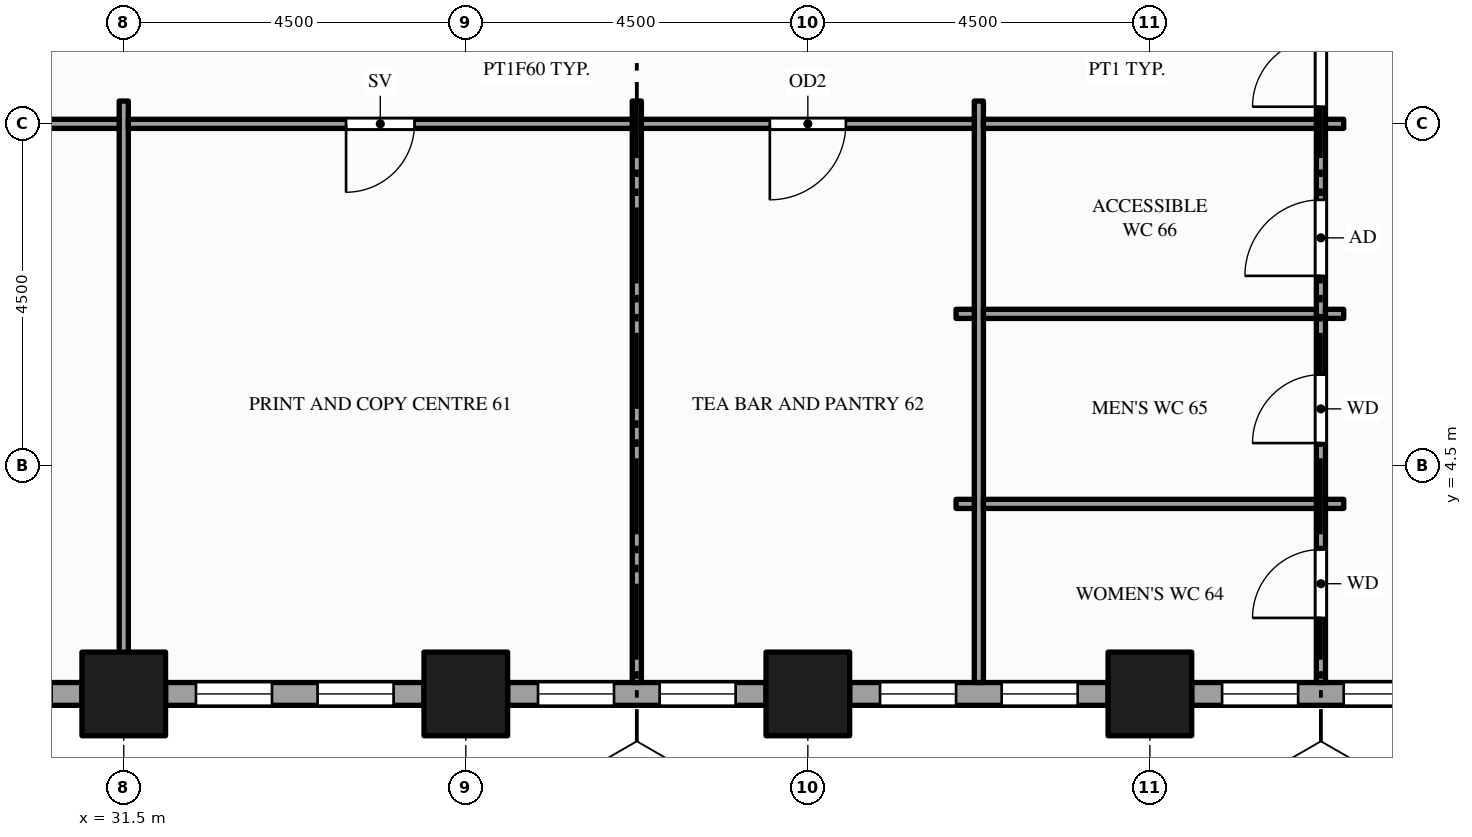
"""IFC4 building model, lengths in metres.
Left out: names, types, materials, properties, quantities, classifications, styles, units other than length and angle.
Written with IfcOpenShell. Run it as: python <this file> out.ifc"""

import sys

from ifc_helpers import new_model, si_unit, direction, frame, frame_2d, origin, origin_2d, place, context, subcontext, project, spatial, rectangle, hollow_rectangle, extrude, element, fill, save


model = new_model("IFC4")
c1 = context("Model", 3, precision=1e-05, world=origin(), true_north=direction((0.0, 1.0)))
c2 = subcontext(c1, "Body", "Model", "MODEL_VIEW")
j1 = project(units=[si_unit("LENGTHUNIT", "METRE"), si_unit("PLANEANGLEUNIT", "RADIAN")], contexts=[c1])
p1 = place(None, origin())
s1 = spatial("IfcSite", under=j1, at=p1, CompositionType="ELEMENT")
p2 = place(p1, origin())
s2 = spatial("IfcBuilding", under=s1, at=p2, CompositionType="ELEMENT")
p3 = place(p2, frame((0.0, 0.0, 69.0)))
s3 = spatial("IfcBuildingStorey", under=s2, at=p3, CompositionType="ELEMENT", Elevation=69.0)
for number, where, z_axis, x_axis in (
    (1, (31.5, 1.5, -0.15), (0.0, 0.0, 1.0), (1.0, 0.0, 0.0)),
    (2, (36.0, 1.5, -0.15), (0.0, 0.0, 1.0), (1.0, 0.0, 0.0)),
    (3, (40.5, 1.5, -0.15), (0.0, 0.0, 1.0), (1.0, 0.0, 0.0)),
    (4, (45.0, 1.5, -0.15), (0.0, 0.0, 1.0), (1.0, 0.0, 0.0)),
):
    element("IfcColumn", number, at=place(p3, frame(where, z_axis=z_axis, x_axis=x_axis)), inside=s3, PredefinedType="COLUMN", context=c2, shape_type="SweptSolid", body=[
        extrude(hollow_rectangle(XDim=1.1, YDim=1.1, WallThickness=0.06, at=origin_2d()), origin(), (0.0, 0.0, 1.0), 4.0),
    ])
p4 = place(p3, frame((27.55, 1.5, 0.0), z_axis=(0.0, 0.0, 1.0), x_axis=(1.0, 0.0, 0.0)))
e5 = element("IfcWall", 5, at=p4, inside=s3, PredefinedType="STANDARD", context=c2, shape_type="SweptSolid", body=[
    extrude(rectangle(XDim=3.4, YDim=0.3, at=frame_2d((1.7, 0.0))), origin(), (0.0, 0.0, 1.0), 3.144),
])
p5 = place(p4, frame((0.4, 0.0, 0.9)))
e6 = element("IfcOpeningElement", 6, at=p5, cuts=e5, PredefinedType="OPENING", context=c2, shape_type="SweptSolid", body=[
    extrude(rectangle(XDim=1.0, YDim=2.0, at=frame_2d((0.5, 1.0))), frame((0.0, 0.16, 0.0), z_axis=(0.0, -1.0, 0.0), x_axis=(1.0, 0.0, 0.0)), (0.0, 0.0, 1.0), 0.32),
])
p6 = place(p4, frame((2.0, 0.0, 0.9)))
e7 = element("IfcOpeningElement", 7, at=p6, cuts=e5, PredefinedType="OPENING", context=c2, shape_type="SweptSolid", body=[
    extrude(rectangle(XDim=1.0, YDim=2.0, at=frame_2d((0.5, 1.0))), frame((0.0, 0.16, 0.0), z_axis=(0.0, -1.0, 0.0), x_axis=(1.0, 0.0, 0.0)), (0.0, 0.0, 1.0), 0.32),
])
p7 = place(p3, frame((32.05, 1.5, 0.0), z_axis=(0.0, 0.0, 1.0), x_axis=(1.0, 0.0, 0.0)))
e8 = element("IfcWall", 8, at=p7, inside=s3, PredefinedType="STANDARD", context=c2, shape_type="SweptSolid", body=[
    extrude(rectangle(XDim=3.4, YDim=0.3, at=frame_2d((1.7, 0.0))), origin(), (0.0, 0.0, 1.0), 3.144),
])
p8 = place(p7, frame((0.4, 0.0, 0.9)))
e9 = element("IfcOpeningElement", 9, at=p8, cuts=e8, PredefinedType="OPENING", context=c2, shape_type="SweptSolid", body=[
    extrude(rectangle(XDim=1.0, YDim=2.0, at=frame_2d((0.5, 1.0))), frame((0.0, 0.16, 0.0), z_axis=(0.0, -1.0, 0.0), x_axis=(1.0, 0.0, 0.0)), (0.0, 0.0, 1.0), 0.32),
])
p9 = place(p7, frame((2.0, 0.0, 0.9)))
e10 = element("IfcOpeningElement", 10, at=p9, cuts=e8, PredefinedType="OPENING", context=c2, shape_type="SweptSolid", body=[
    extrude(rectangle(XDim=1.0, YDim=2.0, at=frame_2d((0.5, 1.0))), frame((0.0, 0.16, 0.0), z_axis=(0.0, -1.0, 0.0), x_axis=(1.0, 0.0, 0.0)), (0.0, 0.0, 1.0), 0.32),
])
p10 = place(p3, frame((36.55, 1.5, 0.0), z_axis=(0.0, 0.0, 1.0), x_axis=(1.0, 0.0, 0.0)))
e11 = element("IfcWall", 11, at=p10, inside=s3, PredefinedType="STANDARD", context=c2, shape_type="SweptSolid", body=[
    extrude(rectangle(XDim=3.4, YDim=0.3, at=frame_2d((1.7, 0.0))), origin(), (0.0, 0.0, 1.0), 3.144),
])
p11 = place(p10, frame((0.4, 0.0, 0.9)))
e12 = element("IfcOpeningElement", 12, at=p11, cuts=e11, PredefinedType="OPENING", context=c2, shape_type="SweptSolid", body=[
    extrude(rectangle(XDim=1.0, YDim=2.0, at=frame_2d((0.5, 1.0))), frame((0.0, 0.16, 0.0), z_axis=(0.0, -1.0, 0.0), x_axis=(1.0, 0.0, 0.0)), (0.0, 0.0, 1.0), 0.32),
])
p12 = place(p10, frame((2.0, 0.0, 0.9)))
e13 = element("IfcOpeningElement", 13, at=p12, cuts=e11, PredefinedType="OPENING", context=c2, shape_type="SweptSolid", body=[
    extrude(rectangle(XDim=1.0, YDim=2.0, at=frame_2d((0.5, 1.0))), frame((0.0, 0.16, 0.0), z_axis=(0.0, -1.0, 0.0), x_axis=(1.0, 0.0, 0.0)), (0.0, 0.0, 1.0), 0.32),
])
p13 = place(p3, frame((41.05, 1.5, 0.0), z_axis=(0.0, 0.0, 1.0), x_axis=(1.0, 0.0, 0.0)))
e14 = element("IfcWall", 14, at=p13, inside=s3, PredefinedType="STANDARD", context=c2, shape_type="SweptSolid", body=[
    extrude(rectangle(XDim=3.4, YDim=0.3, at=frame_2d((1.7, 0.0))), origin(), (0.0, 0.0, 1.0), 3.144),
])
p14 = place(p13, frame((0.4, 0.0, 0.9)))
e15 = element("IfcOpeningElement", 15, at=p14, cuts=e14, PredefinedType="OPENING", context=c2, shape_type="SweptSolid", body=[
    extrude(rectangle(XDim=1.0, YDim=2.0, at=frame_2d((0.5, 1.0))), frame((0.0, 0.16, 0.0), z_axis=(0.0, -1.0, 0.0), x_axis=(1.0, 0.0, 0.0)), (0.0, 0.0, 1.0), 0.32),
])
p15 = place(p13, frame((2.0, 0.0, 0.9)))
e16 = element("IfcOpeningElement", 16, at=p15, cuts=e14, PredefinedType="OPENING", context=c2, shape_type="SweptSolid", body=[
    extrude(rectangle(XDim=1.0, YDim=2.0, at=frame_2d((0.5, 1.0))), frame((0.0, 0.16, 0.0), z_axis=(0.0, -1.0, 0.0), x_axis=(1.0, 0.0, 0.0)), (0.0, 0.0, 1.0), 0.32),
])
p16 = place(p3, frame((45.55, 1.5, 0.0), z_axis=(0.0, 0.0, 1.0), x_axis=(1.0, 0.0, 0.0)))
e17 = element("IfcWall", 17, at=p16, inside=s3, PredefinedType="STANDARD", context=c2, shape_type="SweptSolid", body=[
    extrude(rectangle(XDim=3.4, YDim=0.3, at=frame_2d((1.7, 0.0))), origin(), (0.0, 0.0, 1.0), 3.144),
])
p17 = place(p16, frame((0.4, 0.0, 0.9)))
e18 = element("IfcOpeningElement", 18, at=p17, cuts=e17, PredefinedType="OPENING", context=c2, shape_type="SweptSolid", body=[
    extrude(rectangle(XDim=1.0, YDim=2.0, at=frame_2d((0.5, 1.0))), frame((0.0, 0.16, 0.0), z_axis=(0.0, -1.0, 0.0), x_axis=(1.0, 0.0, 0.0)), (0.0, 0.0, 1.0), 0.32),
])
p18 = place(p16, frame((2.0, 0.0, 0.9)))
e19 = element("IfcOpeningElement", 19, at=p18, cuts=e17, PredefinedType="OPENING", context=c2, shape_type="SweptSolid", body=[
    extrude(rectangle(XDim=1.0, YDim=2.0, at=frame_2d((0.5, 1.0))), frame((0.0, 0.16, 0.0), z_axis=(0.0, -1.0, 0.0), x_axis=(1.0, 0.0, 0.0)), (0.0, 0.0, 1.0), 0.32),
])
for number, where, z_axis, x_axis in (
    (20, (31.5, 1.65, 0.0), (0.0, 0.0, 1.0), (0.0, 1.0, 0.0)),
    (21, (38.25, 1.65, 0.0), (0.0, 0.0, 1.0), (0.0, 1.0, 0.0)),
    (22, (42.75, 1.65, 0.0), (0.0, 0.0, 1.0), (0.0, 1.0, 0.0)),
):
    element("IfcWall", number, at=place(p3, frame(where, z_axis=z_axis, x_axis=x_axis)), inside=s3, PredefinedType="PARTITIONING", context=c2, shape_type="SweptSolid", body=[
        extrude(rectangle(XDim=7.65, YDim=0.12, at=frame_2d((3.825, 0.0))), origin(), (0.0, 0.0, 1.0), 2.938),
    ])
p19 = place(p3, frame((47.25, 1.65, 0.0), z_axis=(0.0, 0.0, 1.0), x_axis=(0.0, 1.0, 0.0)))
e23 = element("IfcWall", 23, at=p19, inside=s3, PredefinedType="PARTITIONING", context=c2, shape_type="SweptSolid", body=[
    extrude(rectangle(XDim=22.2, YDim=0.12, at=frame_2d((11.1, 0.0))), origin(), (0.0, 0.0, 1.0), 2.938),
])
p20 = place(p19, frame((7.575, 0.0, 0.0)))
e24 = element("IfcOpeningElement", 24, at=p20, cuts=e23, PredefinedType="OPENING", context=c2, shape_type="SweptSolid", body=[
    extrude(rectangle(XDim=1.8, YDim=2.1, at=frame_2d((0.9, 1.05))), frame((0.0, 0.07, 0.0), z_axis=(0.0, -1.0, 0.0), x_axis=(1.0, 0.0, 0.0)), (0.0, 0.0, 1.0), 0.14),
])
p21 = place(p19, frame((0.85, 0.0, 0.0)))
e25 = element("IfcOpeningElement", 25, at=p21, cuts=e23, PredefinedType="OPENING", context=c2, shape_type="SweptSolid", body=[
    extrude(rectangle(XDim=0.9, YDim=2.1, at=frame_2d((0.45, 1.05))), frame((0.0, 0.07, 0.0), z_axis=(0.0, -1.0, 0.0), x_axis=(1.0, 0.0, 0.0)), (0.0, 0.0, 1.0), 0.14),
])
p22 = place(p19, frame((3.15, 0.0, 0.0)))
e26 = element("IfcOpeningElement", 26, at=p22, cuts=e23, PredefinedType="OPENING", context=c2, shape_type="SweptSolid", body=[
    extrude(rectangle(XDim=0.9, YDim=2.1, at=frame_2d((0.45, 1.05))), frame((0.0, 0.07, 0.0), z_axis=(0.0, -1.0, 0.0), x_axis=(1.0, 0.0, 0.0)), (0.0, 0.0, 1.0), 0.14),
])
p23 = place(p19, frame((5.35, 0.0, 0.0)))
e27 = element("IfcOpeningElement", 27, at=p23, cuts=e23, PredefinedType="OPENING", context=c2, shape_type="SweptSolid", body=[
    extrude(rectangle(XDim=1.0, YDim=2.1, at=frame_2d((0.5, 1.05))), frame((0.0, 0.07, 0.0), z_axis=(0.0, -1.0, 0.0), x_axis=(1.0, 0.0, 0.0)), (0.0, 0.0, 1.0), 0.14),
])
p24 = place(p3, frame((42.45, 4.0, 0.0), z_axis=(0.0, 0.0, 1.0), x_axis=(1.0, 0.0, 0.0)))
e28 = element("IfcWall", 28, at=p24, inside=s3, PredefinedType="PARTITIONING", context=c2, shape_type="SweptSolid", body=[
    extrude(rectangle(XDim=0.24, YDim=0.12, at=frame_2d((0.12, 0.0))), origin(), (0.0, 0.0, 1.0), 2.938),
])
p25 = place(p3, frame((42.81, 4.0, 0.0), z_axis=(0.0, 0.0, 1.0), x_axis=(1.0, 0.0, 0.0)))
e29 = element("IfcWall", 29, at=p25, inside=s3, PredefinedType="PARTITIONING", context=c2, shape_type="SweptSolid", body=[
    extrude(rectangle(XDim=4.38, YDim=0.12, at=frame_2d((2.19, 0.0))), origin(), (0.0, 0.0, 1.0), 2.938),
])
for number, where, z_axis, x_axis in (
    (30, (47.31, 4.0, 0.0), (0.0, 0.0, 1.0), (1.0, 0.0, 0.0)),
    (31, (42.45, 6.5, 0.0), (0.0, 0.0, 1.0), (1.0, 0.0, 0.0)),
):
    element("IfcWall", number, at=place(p3, frame(where, z_axis=z_axis, x_axis=x_axis)), inside=s3, PredefinedType="PARTITIONING", context=c2, shape_type="SweptSolid", body=[
        extrude(rectangle(XDim=0.24, YDim=0.12, at=frame_2d((0.12, 0.0))), origin(), (0.0, 0.0, 1.0), 2.938),
    ])
p26 = place(p3, frame((42.81, 6.5, 0.0), z_axis=(0.0, 0.0, 1.0), x_axis=(1.0, 0.0, 0.0)))
e32 = element("IfcWall", 32, at=p26, inside=s3, PredefinedType="PARTITIONING", context=c2, shape_type="SweptSolid", body=[
    extrude(rectangle(XDim=4.38, YDim=0.12, at=frame_2d((2.19, 0.0))), origin(), (0.0, 0.0, 1.0), 2.938),
])
p27 = place(p3, frame((47.31, 6.5, 0.0), z_axis=(0.0, 0.0, 1.0), x_axis=(1.0, 0.0, 0.0)))
e33 = element("IfcWall", 33, at=p27, inside=s3, PredefinedType="PARTITIONING", context=c2, shape_type="SweptSolid", body=[
    extrude(rectangle(XDim=0.24, YDim=0.12, at=frame_2d((0.12, 0.0))), origin(), (0.0, 0.0, 1.0), 2.938),
])
p28 = place(p3, frame((27.06, 9.0, 0.0), z_axis=(0.0, 0.0, 1.0), x_axis=(1.0, 0.0, 0.0)))
e34 = element("IfcWall", 34, at=p28, inside=s3, PredefinedType="PARTITIONING", context=c2, shape_type="SweptSolid", body=[
    extrude(rectangle(XDim=4.38, YDim=0.12, at=frame_2d((2.19, 0.0))), origin(), (0.0, 0.0, 1.0), 2.938),
])
p29 = place(p28, frame((1.74, 0.0, 0.0)))
e35 = element("IfcOpeningElement", 35, at=p29, cuts=e34, PredefinedType="OPENING", context=c2, shape_type="SweptSolid", body=[
    extrude(rectangle(XDim=0.9, YDim=2.1, at=frame_2d((0.45, 1.05))), frame((0.0, 0.07, 0.0), z_axis=(0.0, -1.0, 0.0), x_axis=(1.0, 0.0, 0.0)), (0.0, 0.0, 1.0), 0.14),
])
p30 = place(p3, frame((31.56, 9.0, 0.0), z_axis=(0.0, 0.0, 1.0), x_axis=(1.0, 0.0, 0.0)))
e36 = element("IfcWall", 36, at=p30, inside=s3, PredefinedType="PARTITIONING", context=c2, shape_type="SweptSolid", body=[
    extrude(rectangle(XDim=6.63, YDim=0.12, at=frame_2d((3.315, 0.0))), origin(), (0.0, 0.0, 1.0), 2.938),
])
p31 = place(p30, frame((2.865, 0.0, 0.0)))
e37 = element("IfcOpeningElement", 37, at=p31, cuts=e36, PredefinedType="OPENING", context=c2, shape_type="SweptSolid", body=[
    extrude(rectangle(XDim=0.9, YDim=2.1, at=frame_2d((0.45, 1.05))), frame((0.0, 0.07, 0.0), z_axis=(0.0, -1.0, 0.0), x_axis=(1.0, 0.0, 0.0)), (0.0, 0.0, 1.0), 0.14),
])
p32 = place(p3, frame((38.31, 9.0, 0.0), z_axis=(0.0, 0.0, 1.0), x_axis=(1.0, 0.0, 0.0)))
e38 = element("IfcWall", 38, at=p32, inside=s3, PredefinedType="PARTITIONING", context=c2, shape_type="SweptSolid", body=[
    extrude(rectangle(XDim=4.38, YDim=0.12, at=frame_2d((2.19, 0.0))), origin(), (0.0, 0.0, 1.0), 2.938),
])
p33 = place(p32, frame((1.69, 0.0, 0.0)))
e39 = element("IfcOpeningElement", 39, at=p33, cuts=e38, PredefinedType="OPENING", context=c2, shape_type="SweptSolid", body=[
    extrude(rectangle(XDim=1.0, YDim=2.1, at=frame_2d((0.5, 1.05))), frame((0.0, 0.07, 0.0), z_axis=(0.0, -1.0, 0.0), x_axis=(1.0, 0.0, 0.0)), (0.0, 0.0, 1.0), 0.14),
])
p34 = place(p3, frame((42.81, 9.0, 0.0), z_axis=(0.0, 0.0, 1.0), x_axis=(1.0, 0.0, 0.0)))
e40 = element("IfcWall", 40, at=p34, inside=s3, PredefinedType="PARTITIONING", context=c2, shape_type="SweptSolid", body=[
    extrude(rectangle(XDim=4.38, YDim=0.12, at=frame_2d((2.19, 0.0))), origin(), (0.0, 0.0, 1.0), 2.938),
])
p35 = place(p3, frame((47.31, 9.0, 0.0), z_axis=(0.0, 0.0, 1.0), x_axis=(1.0, 0.0, 0.0)))
e41 = element("IfcWall", 41, at=p35, inside=s3, PredefinedType="PARTITIONING", context=c2, shape_type="SweptSolid", body=[
    extrude(rectangle(XDim=0.24, YDim=0.12, at=frame_2d((0.12, 0.0))), origin(), (0.0, 0.0, 1.0), 2.938),
])
p36 = place(p8, origin())
e42 = element("IfcWindow", 42, at=p36, inside=s3, PartitioningType="SINGLE_PANEL", PredefinedType="WINDOW", context=c2, shape_type="SweptSolid", body=[
    extrude(rectangle(XDim=1.0, YDim=2.0, at=frame_2d((0.5, 1.0))), frame((0.0, 0.03, 0.0), z_axis=(0.0, -1.0, 0.0), x_axis=(1.0, 0.0, 0.0)), (0.0, 0.0, 1.0), 0.06),
])
fill(e9, e42)
p37 = place(p9, origin())
e43 = element("IfcWindow", 43, at=p37, inside=s3, PartitioningType="SINGLE_PANEL", PredefinedType="WINDOW", context=c2, shape_type="SweptSolid", body=[
    extrude(rectangle(XDim=1.0, YDim=2.0, at=frame_2d((0.5, 1.0))), frame((0.0, 0.03, 0.0), z_axis=(0.0, -1.0, 0.0), x_axis=(1.0, 0.0, 0.0)), (0.0, 0.0, 1.0), 0.06),
])
fill(e10, e43)
p38 = place(p11, origin())
e44 = element("IfcWindow", 44, at=p38, inside=s3, PartitioningType="SINGLE_PANEL", PredefinedType="WINDOW", context=c2, shape_type="SweptSolid", body=[
    extrude(rectangle(XDim=1.0, YDim=2.0, at=frame_2d((0.5, 1.0))), frame((0.0, 0.03, 0.0), z_axis=(0.0, -1.0, 0.0), x_axis=(1.0, 0.0, 0.0)), (0.0, 0.0, 1.0), 0.06),
])
fill(e12, e44)
p39 = place(p12, origin())
e45 = element("IfcWindow", 45, at=p39, inside=s3, PartitioningType="SINGLE_PANEL", PredefinedType="WINDOW", context=c2, shape_type="SweptSolid", body=[
    extrude(rectangle(XDim=1.0, YDim=2.0, at=frame_2d((0.5, 1.0))), frame((0.0, 0.03, 0.0), z_axis=(0.0, -1.0, 0.0), x_axis=(1.0, 0.0, 0.0)), (0.0, 0.0, 1.0), 0.06),
])
fill(e13, e45)
p40 = place(p14, origin())
e46 = element("IfcWindow", 46, at=p40, inside=s3, PartitioningType="SINGLE_PANEL", PredefinedType="WINDOW", context=c2, shape_type="SweptSolid", body=[
    extrude(rectangle(XDim=1.0, YDim=2.0, at=frame_2d((0.5, 1.0))), frame((0.0, 0.03, 0.0), z_axis=(0.0, -1.0, 0.0), x_axis=(1.0, 0.0, 0.0)), (0.0, 0.0, 1.0), 0.06),
])
fill(e15, e46)
p41 = place(p15, origin())
e47 = element("IfcWindow", 47, at=p41, inside=s3, PartitioningType="SINGLE_PANEL", PredefinedType="WINDOW", context=c2, shape_type="SweptSolid", body=[
    extrude(rectangle(XDim=1.0, YDim=2.0, at=frame_2d((0.5, 1.0))), frame((0.0, 0.03, 0.0), z_axis=(0.0, -1.0, 0.0), x_axis=(1.0, 0.0, 0.0)), (0.0, 0.0, 1.0), 0.06),
])
fill(e16, e47)
p42 = place(p17, origin())
e48 = element("IfcWindow", 48, at=p42, inside=s3, PartitioningType="SINGLE_PANEL", PredefinedType="WINDOW", context=c2, shape_type="SweptSolid", body=[
    extrude(rectangle(XDim=1.0, YDim=2.0, at=frame_2d((0.5, 1.0))), frame((0.0, 0.03, 0.0), z_axis=(0.0, -1.0, 0.0), x_axis=(1.0, 0.0, 0.0)), (0.0, 0.0, 1.0), 0.06),
])
fill(e18, e48)
p43 = place(p18, origin())
e49 = element("IfcWindow", 49, at=p43, inside=s3, PartitioningType="SINGLE_PANEL", PredefinedType="WINDOW", context=c2, shape_type="SweptSolid", body=[
    extrude(rectangle(XDim=1.0, YDim=2.0, at=frame_2d((0.5, 1.0))), frame((0.0, 0.03, 0.0), z_axis=(0.0, -1.0, 0.0), x_axis=(1.0, 0.0, 0.0)), (0.0, 0.0, 1.0), 0.06),
])
fill(e19, e49)
p44 = place(p20, origin())
e50 = element("IfcDoor", 50, at=p44, inside=s3, OperationType="DOUBLE_DOOR_SINGLE_SWING", PredefinedType="DOOR", context=c2, shape_type="SweptSolid", body=[
    extrude(rectangle(XDim=1.8, YDim=2.1, at=frame_2d((0.9, 1.05))), frame((0.0, 0.025, 0.0), z_axis=(0.0, -1.0, 0.0), x_axis=(1.0, 0.0, 0.0)), (0.0, 0.0, 1.0), 0.05),
])
fill(e24, e50)
p45 = place(p31, origin())
e51 = element("IfcDoor", 51, at=p45, inside=s3, OperationType="SINGLE_SWING_LEFT", PredefinedType="DOOR", context=c2, shape_type="SweptSolid", body=[
    extrude(rectangle(XDim=0.9, YDim=2.1, at=frame_2d((0.45, 1.05))), frame((0.0, 0.025, 0.0), z_axis=(0.0, -1.0, 0.0), x_axis=(1.0, 0.0, 0.0)), (0.0, 0.0, 1.0), 0.05),
])
fill(e37, e51)
p46 = place(p33, origin())
e52 = element("IfcDoor", 52, at=p46, inside=s3, OperationType="SINGLE_SWING_LEFT", PredefinedType="DOOR", context=c2, shape_type="SweptSolid", body=[
    extrude(rectangle(XDim=1.0, YDim=2.1, at=frame_2d((0.5, 1.05))), frame((0.0, 0.025, 0.0), z_axis=(0.0, -1.0, 0.0), x_axis=(1.0, 0.0, 0.0)), (0.0, 0.0, 1.0), 0.05),
])
fill(e39, e52)
p47 = place(p21, origin())
e53 = element("IfcDoor", 53, at=p47, inside=s3, OperationType="SINGLE_SWING_LEFT", PredefinedType="DOOR", context=c2, shape_type="SweptSolid", body=[
    extrude(rectangle(XDim=0.9, YDim=2.1, at=frame_2d((0.45, 1.05))), frame((0.0, 0.025, 0.0), z_axis=(0.0, -1.0, 0.0), x_axis=(1.0, 0.0, 0.0)), (0.0, 0.0, 1.0), 0.05),
])
fill(e25, e53)
p48 = place(p22, origin())
e54 = element("IfcDoor", 54, at=p48, inside=s3, OperationType="SINGLE_SWING_LEFT", PredefinedType="DOOR", context=c2, shape_type="SweptSolid", body=[
    extrude(rectangle(XDim=0.9, YDim=2.1, at=frame_2d((0.45, 1.05))), frame((0.0, 0.025, 0.0), z_axis=(0.0, -1.0, 0.0), x_axis=(1.0, 0.0, 0.0)), (0.0, 0.0, 1.0), 0.05),
])
fill(e26, e54)
p49 = place(p23, origin())
e55 = element("IfcDoor", 55, at=p49, inside=s3, OperationType="SINGLE_SWING_LEFT", PredefinedType="DOOR", context=c2, shape_type="SweptSolid", body=[
    extrude(rectangle(XDim=1.0, YDim=2.1, at=frame_2d((0.5, 1.05))), frame((0.0, 0.025, 0.0), z_axis=(0.0, -1.0, 0.0), x_axis=(1.0, 0.0, 0.0)), (0.0, 0.0, 1.0), 0.05),
])
fill(e27, e55)
save(model, sys.argv[1])
